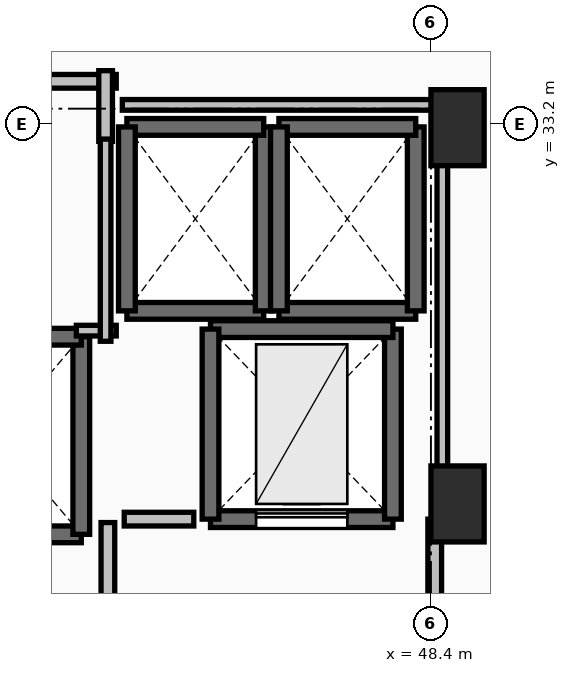
"""IFC4 building model, lengths in metres.
Left out: names, types, materials, properties, quantities, classifications, styles, units other than length and angle.
Written with IfcOpenShell. Run it as: python <this file> out.ifc"""

import sys

from ifc_helpers import new_model, si_unit, direction, frame, frame_2d, origin, origin_2d, place, context, subcontext, project, spatial, rectangle, extrude, element, fill, save


model = new_model("IFC4")
c1 = context("Model", 3, precision=1e-05, world=origin(), true_north=direction((0.0, 1.0)))
c2 = subcontext(c1, "Body", "Model", "MODEL_VIEW")
j1 = project(units=[si_unit("LENGTHUNIT", "METRE"), si_unit("PLANEANGLEUNIT", "RADIAN")], contexts=[c1])
p1 = place(None, origin())
s1 = spatial("IfcSite", under=j1, at=p1, CompositionType="ELEMENT")
p2 = place(p1, origin())
s2 = spatial("IfcBuilding", under=s1, at=p2, CompositionType="ELEMENT")
p3 = place(p2, frame((0.0, 0.0, 182.6)))
s3 = spatial("IfcBuildingStorey", under=s2, at=p3, CompositionType="ELEMENT", Elevation=182.6)
for number, where, z_axis, x_axis in (
    (1, (48.75, 33.15, 0.0), (0.0, 0.0, 1.0), (1.0, 0.0, 0.0)),
    (2, (48.75, 28.2, 0.0), (0.0, 0.0, 1.0), (1.0, 0.0, 0.0)),
):
    element("IfcColumn", number, at=place(p3, frame(where, z_axis=z_axis, x_axis=x_axis)), inside=s3, PredefinedType="PILASTER", context=c2, shape_type="SweptSolid", body=[
        extrude(rectangle(XDim=0.7, YDim=1.0, at=origin_2d()), origin(), (0.0, 0.0, 1.0), 3.5),
    ])
p4 = place(p3, frame((41.6, 27.8, 0.0), z_axis=(0.0, 0.0, 1.0), x_axis=(1.0, 0.0, 0.0)))
e3 = element("IfcWall", 3, at=p4, inside=s3, PredefinedType="SOLIDWALL", context=c2, shape_type="SweptSolid", body=[
    extrude(rectangle(XDim=2.2, YDim=0.22, at=frame_2d((1.1, 0.0))), origin(), (0.0, 0.0, 1.0), 3.24),
])
p5 = place(p3, frame((43.8, 27.8, 0.0), z_axis=(0.0, 0.0, 1.0), x_axis=(0.0, 1.0, 0.0)))
e4 = element("IfcWall", 4, at=p5, inside=s3, PredefinedType="SOLIDWALL", context=c2, shape_type="SweptSolid", body=[
    extrude(rectangle(XDim=2.6, YDim=0.22, at=frame_2d((1.3, 0.0))), origin(), (0.0, 0.0, 1.0), 3.24),
])
p6 = place(p3, frame((43.8, 30.4, 0.0), z_axis=(0.0, 0.0, 1.0), x_axis=(-1.0, 0.0, 0.0)))
e5 = element("IfcWall", 5, at=p6, inside=s3, PredefinedType="SOLIDWALL", context=c2, shape_type="SweptSolid", body=[
    extrude(rectangle(XDim=2.2, YDim=0.22, at=frame_2d((1.1, 0.0))), origin(), (0.0, 0.0, 1.0), 3.24),
])
p7 = place(p3, frame((44.4, 30.74, 0.0), z_axis=(0.0, 0.0, 1.0), x_axis=(1.0, 0.0, 0.0)))
e6 = element("IfcWall", 6, at=p7, inside=s3, PredefinedType="SOLIDWALL", context=c2, shape_type="SweptSolid", body=[
    extrude(rectangle(XDim=1.8, YDim=0.22, at=frame_2d((0.9, 0.0))), origin(), (0.0, 0.0, 1.0), 3.24),
])
p8 = place(p3, frame((46.2, 30.74, 0.0), z_axis=(0.0, 0.0, 1.0), x_axis=(0.0, 1.0, 0.0)))
e7 = element("IfcWall", 7, at=p8, inside=s3, PredefinedType="SOLIDWALL", context=c2, shape_type="SweptSolid", body=[
    extrude(rectangle(XDim=2.42, YDim=0.22, at=frame_2d((1.21, 0.0))), origin(), (0.0, 0.0, 1.0), 3.24),
])
p9 = place(p3, frame((46.2, 33.16, 0.0), z_axis=(0.0, 0.0, 1.0), x_axis=(-1.0, 0.0, 0.0)))
e8 = element("IfcWall", 8, at=p9, inside=s3, PredefinedType="SOLIDWALL", context=c2, shape_type="SweptSolid", body=[
    extrude(rectangle(XDim=1.8, YDim=0.22, at=frame_2d((0.9, 0.0))), origin(), (0.0, 0.0, 1.0), 3.24),
])
p10 = place(p3, frame((44.4, 33.16, 0.0), z_axis=(0.0, 0.0, 1.0), x_axis=(0.0, -1.0, 0.0)))
e9 = element("IfcWall", 9, at=p10, inside=s3, PredefinedType="SOLIDWALL", context=c2, shape_type="SweptSolid", body=[
    extrude(rectangle(XDim=2.42, YDim=0.22, at=frame_2d((1.21, 0.0))), origin(), (0.0, 0.0, 1.0), 3.24),
])
p11 = place(p3, frame((46.4, 30.74, 0.0), z_axis=(0.0, 0.0, 1.0), x_axis=(1.0, 0.0, 0.0)))
e10 = element("IfcWall", 10, at=p11, inside=s3, PredefinedType="SOLIDWALL", context=c2, shape_type="SweptSolid", body=[
    extrude(rectangle(XDim=1.8, YDim=0.22, at=frame_2d((0.9, 0.0))), origin(), (0.0, 0.0, 1.0), 3.24),
])
p12 = place(p3, frame((48.2, 30.74, 0.0), z_axis=(0.0, 0.0, 1.0), x_axis=(0.0, 1.0, 0.0)))
e11 = element("IfcWall", 11, at=p12, inside=s3, PredefinedType="SOLIDWALL", context=c2, shape_type="SweptSolid", body=[
    extrude(rectangle(XDim=2.42, YDim=0.22, at=frame_2d((1.21, 0.0))), origin(), (0.0, 0.0, 1.0), 3.24),
])
p13 = place(p3, frame((48.2, 33.16, 0.0), z_axis=(0.0, 0.0, 1.0), x_axis=(-1.0, 0.0, 0.0)))
e12 = element("IfcWall", 12, at=p13, inside=s3, PredefinedType="SOLIDWALL", context=c2, shape_type="SweptSolid", body=[
    extrude(rectangle(XDim=1.8, YDim=0.22, at=frame_2d((0.9, 0.0))), origin(), (0.0, 0.0, 1.0), 3.24),
])
p14 = place(p3, frame((46.4, 33.16, 0.0), z_axis=(0.0, 0.0, 1.0), x_axis=(0.0, -1.0, 0.0)))
e13 = element("IfcWall", 13, at=p14, inside=s3, PredefinedType="SOLIDWALL", context=c2, shape_type="SweptSolid", body=[
    extrude(rectangle(XDim=2.42, YDim=0.22, at=frame_2d((1.21, 0.0))), origin(), (0.0, 0.0, 1.0), 3.24),
])
p15 = place(p3, frame((45.5, 28.0, 0.0), z_axis=(0.0, 0.0, 1.0), x_axis=(1.0, 0.0, 0.0)))
e14 = element("IfcWall", 14, at=p15, inside=s3, PredefinedType="SHEAR", context=c2, shape_type="SweptSolid", body=[
    extrude(rectangle(XDim=2.4, YDim=0.22, at=frame_2d((1.2, 0.0))), origin(), (0.0, 0.0, 1.0), 3.24),
])
p16 = place(p15, frame((0.6, 0.0, 0.0)))
e15 = element("IfcOpeningElement", 15, at=p16, cuts=e14, PredefinedType="OPENING", context=c2, shape_type="SweptSolid", body=[
    extrude(rectangle(XDim=1.2, YDim=2.2, at=frame_2d((0.6, 1.1))), frame((0.0, 0.125, 0.0), z_axis=(0.0, -1.0, 0.0), x_axis=(1.0, 0.0, 0.0)), (0.0, 0.0, 1.0), 0.25),
])
p17 = place(p3, frame((47.9, 28.0, 0.0), z_axis=(0.0, 0.0, 1.0), x_axis=(0.0, 1.0, 0.0)))
e16 = element("IfcWall", 16, at=p17, inside=s3, PredefinedType="SHEAR", context=c2, shape_type="SweptSolid", body=[
    extrude(rectangle(XDim=2.5, YDim=0.22, at=frame_2d((1.25, 0.0))), origin(), (0.0, 0.0, 1.0), 3.24),
])
p18 = place(p3, frame((47.9, 30.5, 0.0), z_axis=(0.0, 0.0, 1.0), x_axis=(-1.0, 0.0, 0.0)))
e17 = element("IfcWall", 17, at=p18, inside=s3, PredefinedType="SHEAR", context=c2, shape_type="SweptSolid", body=[
    extrude(rectangle(XDim=2.4, YDim=0.22, at=frame_2d((1.2, 0.0))), origin(), (0.0, 0.0, 1.0), 3.24),
])
p19 = place(p3, frame((45.5, 30.5, 0.0), z_axis=(0.0, 0.0, 1.0), x_axis=(0.0, -1.0, 0.0)))
e18 = element("IfcWall", 18, at=p19, inside=s3, PredefinedType="SHEAR", context=c2, shape_type="SweptSolid", body=[
    extrude(rectangle(XDim=2.5, YDim=0.22, at=frame_2d((1.25, 0.0))), origin(), (0.0, 0.0, 1.0), 3.24),
])
p20 = place(p3, frame((44.15, 27.955, 0.0), z_axis=(0.0, 0.0, 1.0), x_axis=(0.0, -1.0, 0.0)))
e19 = element("IfcWall", 19, at=p20, inside=s3, PredefinedType="PARTITIONING", context=c2, shape_type="SweptSolid", body=[
    extrude(rectangle(XDim=3.91, YDim=0.18, at=frame_2d((1.955, 0.0))), origin(), (0.0, 0.0, 1.0), 3.24),
])
p21 = place(p20, frame((1.355, 0.0, 0.0)))
e20 = element("IfcOpeningElement", 20, at=p21, cuts=e19, PredefinedType="OPENING", context=c2, shape_type="SweptSolid", body=[
    extrude(rectangle(XDim=1.2, YDim=2.15, at=frame_2d((0.6, 1.075))), frame((0.0, 0.105, 0.0), z_axis=(0.0, -1.0, 0.0), x_axis=(1.0, 0.0, 0.0)), (0.0, 0.0, 1.0), 0.21),
])
p22 = place(p3, frame((48.45, 23.95, 0.0), z_axis=(0.0, 0.0, 1.0), x_axis=(0.0, 1.0, 0.0)))
e21 = element("IfcWall", 21, at=p22, inside=s3, PredefinedType="PARTITIONING", context=c2, shape_type="SweptSolid", body=[
    extrude(rectangle(XDim=4.05, YDim=0.18, at=frame_2d((2.025, 0.0))), origin(), (0.0, 0.0, 1.0), 3.24),
])
p23 = place(p22, frame((1.425, 0.0, 0.0)))
e22 = element("IfcOpeningElement", 22, at=p23, cuts=e21, PredefinedType="OPENING", context=c2, shape_type="SweptSolid", body=[
    extrude(rectangle(XDim=1.2, YDim=2.15, at=frame_2d((0.6, 1.075))), frame((0.0, 0.105, 0.0), z_axis=(0.0, -1.0, 0.0), x_axis=(1.0, 0.0, 0.0)), (0.0, 0.0, 1.0), 0.21),
])
p24 = place(p3, frame((44.26, 33.76, 0.0), z_axis=(0.0, 0.0, 1.0), x_axis=(-1.0, 0.0, 0.0)))
e23 = element("IfcWall", 23, at=p24, inside=s3, PredefinedType="PARTITIONING", context=c2, shape_type="SweptSolid", body=[
    extrude(rectangle(XDim=6.91, YDim=0.18, at=frame_2d((3.455, 0.0))), origin(), (0.0, 0.0, 1.0), 3.24),
])
p25 = place(p24, frame((3.03, 0.0, 0.0)))
e24 = element("IfcOpeningElement", 24, at=p25, cuts=e23, PredefinedType="OPENING", context=c2, shape_type="SweptSolid", body=[
    extrude(rectangle(XDim=0.85, YDim=2.1, at=frame_2d((0.425, 1.05))), frame((0.0, 0.105, 0.0), z_axis=(0.0, -1.0, 0.0), x_axis=(1.0, 0.0, 0.0)), (0.0, 0.0, 1.0), 0.21),
])
p26 = place(p3, frame((44.12, 32.97, 0.0), z_axis=(0.0, 0.0, 1.0), x_axis=(0.0, 1.0, 0.0)))
e25 = element("IfcWall", 25, at=p26, inside=s3, PredefinedType="PARTITIONING", context=c2, shape_type="SweptSolid", body=[
    extrude(rectangle(XDim=0.93, YDim=0.18, at=frame_2d((0.465, 0.0))), origin(), (0.0, 0.0, 1.0), 3.24),
])
p27 = place(p3, frame((45.28, 28.0, 0.0), z_axis=(0.0, 0.0, 1.0), x_axis=(-1.0, 0.0, 0.0)))
e26 = element("IfcWall", 26, at=p27, inside=s3, PredefinedType="PARTITIONING", context=c2, shape_type="SweptSolid", body=[
    extrude(rectangle(XDim=0.915, YDim=0.18, at=frame_2d((0.458, 0.0))), origin(), (0.0, 0.0, 1.0), 3.24),
])
p28 = place(p3, frame((43.735, 30.48, 0.0), z_axis=(0.0, 0.0, 1.0), x_axis=(1.0, 0.0, 0.0)))
e27 = element("IfcWall", 27, at=p28, inside=s3, PredefinedType="PARTITIONING", context=c2, shape_type="SweptSolid", body=[
    extrude(rectangle(XDim=0.525, YDim=0.14, at=frame_2d((0.262, 0.0))), origin(), (0.0, 0.0, 1.0), 3.24),
])
p29 = place(p3, frame((44.12, 30.34, 0.0), z_axis=(0.0, 0.0, 1.0), x_axis=(0.0, 1.0, 0.0)))
e28 = element("IfcWall", 28, at=p29, inside=s3, PredefinedType="PARTITIONING", context=c2, shape_type="SweptSolid", body=[
    extrude(rectangle(XDim=2.66, YDim=0.14, at=frame_2d((1.33, 0.0))), origin(), (0.0, 0.0, 1.0), 3.24),
])
p30 = place(p3, frame((48.55, 28.196, 0.0), z_axis=(0.0, 0.0, 1.0), x_axis=(0.0, 1.0, 0.0)))
e29 = element("IfcWall", 29, at=p30, inside=s3, PredefinedType="PARTITIONING", context=c2, shape_type="SweptSolid", body=[
    extrude(rectangle(XDim=5.254, YDim=0.14, at=frame_2d((2.627, 0.0))), origin(), (0.0, 0.0, 1.0), 2.432),
])
p31 = place(p3, frame((48.55, 33.45, 0.0), z_axis=(0.0, 0.0, 1.0), x_axis=(-1.0, 0.0, 0.0)))
e30 = element("IfcWall", 30, at=p31, inside=s3, PredefinedType="PARTITIONING", context=c2, shape_type="SweptSolid", body=[
    extrude(rectangle(XDim=4.21, YDim=0.14, at=frame_2d((2.105, 0.0))), origin(), (0.0, 0.0, 1.0), 2.432),
])
p32 = place(p16, origin())
e31 = element("IfcDoor", 31, at=p32, inside=s3, OperationType="SLIDING_TO_LEFT", PredefinedType="DOOR", context=c2, shape_type="SweptSolid", body=[
    extrude(rectangle(XDim=1.2, YDim=2.2, at=frame_2d((0.6, 1.1))), frame((0.0, 0.025, 0.0), z_axis=(0.0, -1.0, 0.0), x_axis=(1.0, 0.0, 0.0)), (0.0, 0.0, 1.0), 0.05),
])
fill(e15, e31)
save(model, sys.argv[1])
